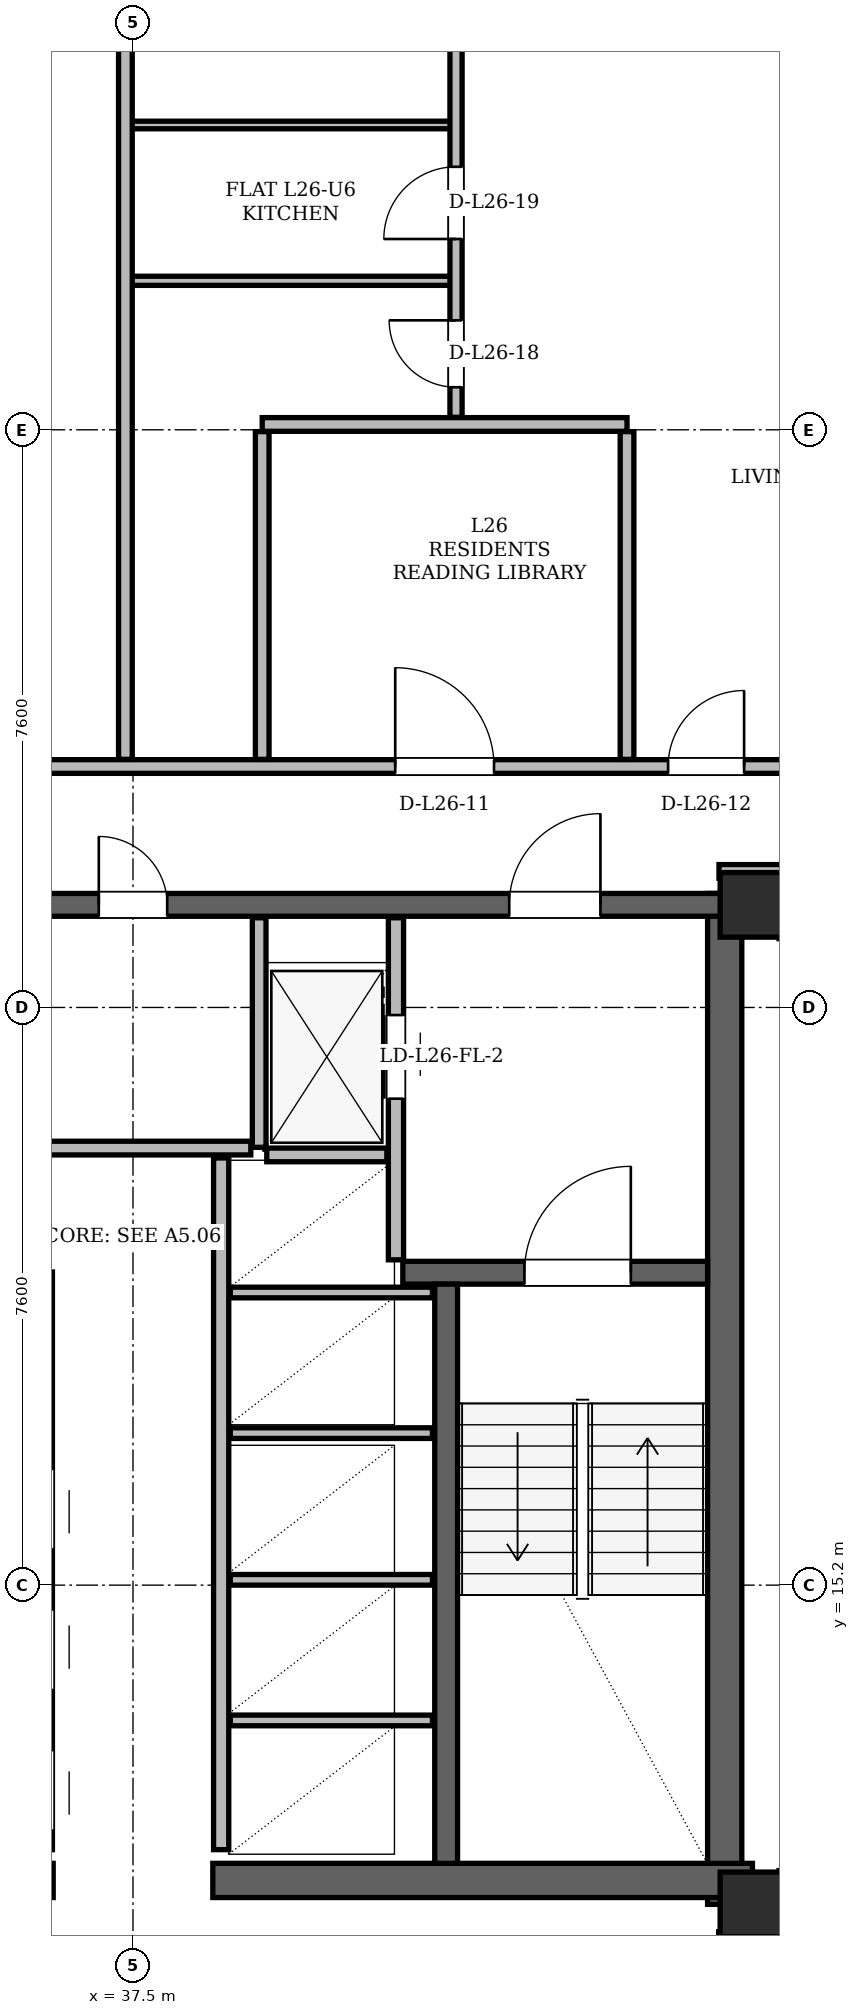
"""IFC4 building model, lengths in metres.
Left out: names, types, materials, properties, quantities, classifications, styles, units other than length and angle.
Written with IfcOpenShell. Run it as: python <this file> out.ifc"""

import sys

from ifc_helpers import new_model, si_unit, direction, frame, frame_2d, origin, origin_2d, place, context, subcontext, project, spatial, rectangle, hollow_rectangle, extrude, element, fill, save


model = new_model("IFC4")
c1 = context("Model", 3, precision=1e-05, world=origin(), true_north=direction((0.0, 1.0)))
c2 = subcontext(c1, "Body", "Model", "MODEL_VIEW")
j1 = project(units=[si_unit("LENGTHUNIT", "METRE"), si_unit("PLANEANGLEUNIT", "RADIAN")], contexts=[c1])
p1 = place(None, origin())
s1 = spatial("IfcSite", under=j1, at=p1, CompositionType="ELEMENT")
p2 = place(p1, origin())
s2 = spatial("IfcBuilding", under=s1, at=p2, CompositionType="ELEMENT")
p3 = place(p2, frame((0.0, 0.0, 100.5)))
s3 = spatial("IfcBuildingStorey", under=s2, at=p3, CompositionType="ELEMENT", Elevation=100.5)
for number, where, z_axis, x_axis in (
    (1, (45.65, 11.0, 0.0), (0.0, 0.0, 1.0), (1.0, 0.0, 0.0)),
    (2, (45.65, 24.15, 0.0), (0.0, 0.0, 1.0), (1.0, 0.0, 0.0)),
):
    element("IfcColumn", number, at=place(p3, frame(where, z_axis=z_axis, x_axis=x_axis)), inside=s3, PredefinedType="COLUMN", context=c2, shape_type="SweptSolid", body=[
        extrude(hollow_rectangle(XDim=0.85, YDim=0.85, WallThickness=0.07, at=origin_2d()), origin(), (0.0, 0.0, 1.0), 3.6),
    ])
p4 = place(p3, frame((45.285, 11.0, 0.0), z_axis=(0.0, 0.0, 1.0), x_axis=(0.0, 1.0, 0.0)))
e3 = element("IfcWall", 3, at=p4, inside=s3, PredefinedType="SHEAR", context=c2, shape_type="SweptSolid", body=[
    extrude(rectangle(XDim=13.3, YDim=0.45, at=frame_2d((6.65, 0.0))), origin(), (0.0, 0.0, 1.0), 3.36),
])
for number, where, z_axis, x_axis in (
    (4, (29.35, 11.315, 0.0), (0.0, 0.0, 1.0), (1.0, 0.0, 0.0)),
    (5, (38.55, 11.315, 0.0), (0.0, 0.0, 1.0), (1.0, 0.0, 0.0)),
):
    element("IfcWall", number, at=place(p3, frame(where, z_axis=z_axis, x_axis=x_axis)), inside=s3, PredefinedType="SHEAR", context=c2, shape_type="SweptSolid", body=[
        extrude(rectangle(XDim=7.1, YDim=0.45, at=frame_2d((3.55, 0.0))), origin(), (0.0, 0.0, 1.0), 3.36),
    ])
p5 = place(p3, frame((29.65, 24.15, 0.0), z_axis=(0.0, 0.0, 1.0), x_axis=(1.0, 0.0, 0.0)))
e6 = element("IfcWall", 6, at=p5, inside=s3, PredefinedType="SHEAR", context=c2, shape_type="SweptSolid", body=[
    extrude(rectangle(XDim=15.7, YDim=0.3, at=frame_2d((7.85, 0.0))), origin(), (0.0, 0.0, 1.0), 3.36),
])
p6 = place(p5, frame((1.7, 0.0, 0.0)))
e7 = element("IfcOpeningElement", 7, at=p6, cuts=e6, PredefinedType="OPENING", context=c2, shape_type="SweptSolid", body=[
    extrude(rectangle(XDim=1.2, YDim=2.2, at=frame_2d((0.6, 1.1))), frame((0.0, 0.15, 0.0), z_axis=(0.0, -1.0, 0.0), x_axis=(1.0, 0.0, 0.0)), (0.0, 0.0, 1.0), 0.3),
])
p7 = place(p5, frame((12.8, 0.0, 0.0)))
e8 = element("IfcOpeningElement", 8, at=p7, cuts=e6, PredefinedType="OPENING", context=c2, shape_type="SweptSolid", body=[
    extrude(rectangle(XDim=1.2, YDim=2.2, at=frame_2d((0.6, 1.1))), frame((0.0, 0.15, 0.0), z_axis=(0.0, -1.0, 0.0), x_axis=(1.0, 0.0, 0.0)), (0.0, 0.0, 1.0), 0.3),
])
p8 = place(p5, frame((7.4, 0.0, 0.0)))
e9 = element("IfcOpeningElement", 9, at=p8, cuts=e6, PredefinedType="OPENING", context=c2, shape_type="SweptSolid", body=[
    extrude(rectangle(XDim=0.9, YDim=2.05, at=frame_2d((0.45, 1.025))), frame((0.0, 0.15, 0.0), z_axis=(0.0, -1.0, 0.0), x_axis=(1.0, 0.0, 0.0)), (0.0, 0.0, 1.0), 0.3),
])
p9 = place(p3, frame((41.05, 19.31, 0.0), z_axis=(0.0, 0.0, 1.0), x_axis=(1.0, 0.0, 0.0)))
e10 = element("IfcWall", 10, at=p9, inside=s3, PredefinedType="SHEAR", context=c2, shape_type="SweptSolid", body=[
    extrude(rectangle(XDim=4.01, YDim=0.3, at=frame_2d((2.005, 0.0))), origin(), (0.0, 0.0, 1.0), 3.36),
])
p10 = place(p9, frame((1.6, 0.0, 0.0)))
e11 = element("IfcOpeningElement", 11, at=p10, cuts=e10, PredefinedType="OPENING", context=c2, shape_type="SweptSolid", body=[
    extrude(rectangle(XDim=1.4, YDim=2.2, at=frame_2d((0.7, 1.1))), frame((0.0, 0.15, 0.0), z_axis=(0.0, -1.0, 0.0), x_axis=(1.0, 0.0, 0.0)), (0.0, 0.0, 1.0), 0.3),
])
p11 = place(p3, frame((41.62, 11.54, 0.0), z_axis=(0.0, 0.0, 1.0), x_axis=(0.0, 1.0, 0.0)))
e12 = element("IfcWall", 12, at=p11, inside=s3, PredefinedType="SHEAR", context=c2, shape_type="SweptSolid", body=[
    extrude(rectangle(XDim=7.62, YDim=0.3, at=frame_2d((3.81, 0.0))), origin(), (0.0, 0.0, 1.0), 3.36),
])
p12 = place(p3, frame((60.69, 13.561, 0.0), z_axis=(0.0, 0.0, 1.0), x_axis=(-0.500002056916, 0.86602421622, 0.0)))
e13 = element("IfcWall", 13, at=p12, inside=s3, PredefinedType="SOLIDWALL", context=c2, shape_type="SweptSolid", body=[
    extrude(rectangle(XDim=34.516, YDim=0.34, at=frame_2d((17.258, 0.0))), origin(), (0.0, 0.0, 1.0), 2.578),
])
p13 = place(p12, frame((8.034, 0.0, 0.0)))
e14 = element("IfcOpeningElement", 14, at=p13, cuts=e13, PredefinedType="OPENING", context=c2, shape_type="SweptSolid", body=[
    extrude(rectangle(XDim=1.5, YDim=2.2, at=frame_2d((0.75, 1.1))), frame((0.0, 0.17, 0.0), z_axis=(0.0, -1.0, 0.0), x_axis=(1.0, 0.0, 0.0)), (0.0, 0.0, 1.0), 0.34),
])
p14 = place(p12, frame((26.647, 0.0, 0.0)))
e15 = element("IfcOpeningElement", 15, at=p14, cuts=e13, PredefinedType="OPENING", context=c2, shape_type="SweptSolid", body=[
    extrude(rectangle(XDim=1.5, YDim=2.2, at=frame_2d((0.75, 1.1))), frame((0.0, 0.17, 0.0), z_axis=(0.0, -1.0, 0.0), x_axis=(1.0, 0.0, 0.0)), (0.0, 0.0, 1.0), 0.34),
])
p15 = place(p12, frame((1.477, 0.0, 0.85)))
e16 = element("IfcOpeningElement", 16, at=p15, cuts=e13, PredefinedType="OPENING", context=c2, shape_type="SweptSolid", body=[
    extrude(rectangle(XDim=2.5, YDim=1.618, at=frame_2d((1.25, 0.809))), frame((0.0, 0.17, 0.0), z_axis=(0.0, -1.0, 0.0), x_axis=(1.0, 0.0, 0.0)), (0.0, 0.0, 1.0), 0.34),
])
p16 = place(p12, frame((16.107, 0.0, 0.85)))
e17 = element("IfcOpeningElement", 17, at=p16, cuts=e13, PredefinedType="OPENING", context=c2, shape_type="SweptSolid", body=[
    extrude(rectangle(XDim=1.4, YDim=1.6, at=frame_2d((0.7, 0.8))), frame((0.0, 0.17, 0.0), z_axis=(0.0, -1.0, 0.0), x_axis=(1.0, 0.0, 0.0)), (0.0, 0.0, 1.0), 0.34),
])
p17 = place(p12, frame((30.693, 0.0, 0.85)))
e18 = element("IfcOpeningElement", 18, at=p17, cuts=e13, PredefinedType="OPENING", context=c2, shape_type="SweptSolid", body=[
    extrude(rectangle(XDim=2.5, YDim=1.618, at=frame_2d((1.25, 0.809))), frame((0.0, 0.17, 0.0), z_axis=(0.0, -1.0, 0.0), x_axis=(1.0, 0.0, 0.0)), (0.0, 0.0, 1.0), 0.34),
])
p18 = place(p3, frame((40.96, 19.48, 0.0), z_axis=(0.0, 0.0, 1.0), x_axis=(0.0, 1.0, 0.0)))
e19 = element("IfcWall", 19, at=p18, inside=s3, PredefinedType="PARTITIONING", context=c2, shape_type="SweptSolid", body=[
    extrude(rectangle(XDim=4.5, YDim=0.2, at=frame_2d((2.25, 0.0))), origin(), (0.0, 0.0, 1.0), 2.4),
])
p19 = place(p18, frame((2.12, 0.0, 0.0)))
e20 = element("IfcOpeningElement", 20, at=p19, cuts=e19, PredefinedType="OPENING", context=c2, shape_type="SweptSolid", body=[
    extrude(rectangle(XDim=1.1, YDim=2.2, at=frame_2d((0.55, 1.1))), frame((0.0, 0.1, 0.0), z_axis=(0.0, -1.0, 0.0), x_axis=(1.0, 0.0, 0.0)), (0.0, 0.0, 1.0), 0.2),
])
p20 = place(p3, frame((39.16, 20.96, 0.0), z_axis=(0.0, 0.0, 1.0), x_axis=(0.0, 1.0, 0.0)))
e21 = element("IfcWall", 21, at=p20, inside=s3, PredefinedType="PARTITIONING", context=c2, shape_type="SweptSolid", body=[
    extrude(rectangle(XDim=3.02, YDim=0.18, at=frame_2d((1.51, 0.0))), origin(), (0.0, 0.0, 1.0), 2.4),
])
p21 = place(p3, frame((39.26, 20.86, 0.0), z_axis=(0.0, 0.0, 1.0), x_axis=(1.0, 0.0, 0.0)))
e22 = element("IfcWall", 22, at=p21, inside=s3, PredefinedType="PARTITIONING", context=c2, shape_type="SweptSolid", body=[
    extrude(rectangle(XDim=1.58, YDim=0.18, at=frame_2d((0.79, 0.0))), origin(), (0.0, 0.0, 1.0), 3.36),
])
p22 = place(p3, frame((36.34, 11.72, 0.0), z_axis=(0.0, 0.0, 1.0), x_axis=(0.0, 1.0, 0.0)))
e23 = element("IfcWall", 23, at=p22, inside=s3, PredefinedType="PARTITIONING", context=c2, shape_type="SweptSolid", body=[
    extrude(rectangle(XDim=7.6, YDim=0.2, at=frame_2d((3.8, 0.0))), origin(), (0.0, 0.0, 1.0), 3.36),
])
p23 = place(p22, frame((0.255, 0.0, 0.0)))
e24 = element("IfcOpeningElement", 24, at=p23, cuts=e23, PredefinedType="OPENING", context=c2, shape_type="SweptSolid", body=[
    extrude(rectangle(XDim=1.05, YDim=2.15, at=frame_2d((0.525, 1.075))), frame((0.0, 0.1, 0.0), z_axis=(0.0, -1.0, 0.0), x_axis=(1.0, 0.0, 0.0)), (0.0, 0.0, 1.0), 0.2),
])
p24 = place(p22, frame((2.105, 0.0, 0.0)))
e25 = element("IfcOpeningElement", 25, at=p24, cuts=e23, PredefinedType="OPENING", context=c2, shape_type="SweptSolid", body=[
    extrude(rectangle(XDim=1.05, YDim=2.15, at=frame_2d((0.525, 1.075))), frame((0.0, 0.1, 0.0), z_axis=(0.0, -1.0, 0.0), x_axis=(1.0, 0.0, 0.0)), (0.0, 0.0, 1.0), 0.2),
])
p25 = place(p22, frame((3.955, 0.0, 0.0)))
e26 = element("IfcOpeningElement", 26, at=p25, cuts=e23, PredefinedType="OPENING", context=c2, shape_type="SweptSolid", body=[
    extrude(rectangle(XDim=1.05, YDim=2.15, at=frame_2d((0.525, 1.075))), frame((0.0, 0.1, 0.0), z_axis=(0.0, -1.0, 0.0), x_axis=(1.0, 0.0, 0.0)), (0.0, 0.0, 1.0), 0.2),
])
p26 = place(p3, frame((38.66, 11.72, 0.0), z_axis=(0.0, 0.0, 1.0), x_axis=(0.0, 1.0, 0.0)))
e27 = element("IfcWall", 27, at=p26, inside=s3, PredefinedType="PARTITIONING", context=c2, shape_type="SweptSolid", body=[
    extrude(rectangle(XDim=9.1, YDim=0.2, at=frame_2d((4.55, 0.0))), origin(), (0.0, 0.0, 1.0), 3.36),
])
for number, where, z_axis, x_axis in (
    (28, (38.78, 13.42, 0.0), (0.0, 0.0, 1.0), (1.0, 0.0, 0.0)),
    (29, (38.78, 15.27, 0.0), (0.0, 0.0, 1.0), (1.0, 0.0, 0.0)),
    (30, (38.78, 17.2, 0.0), (0.0, 0.0, 1.0), (1.0, 0.0, 0.0)),
    (31, (38.78, 19.05, 0.0), (0.0, 0.0, 1.0), (1.0, 0.0, 0.0)),
):
    element("IfcWall", number, at=place(p3, frame(where, z_axis=z_axis, x_axis=x_axis)), inside=s3, PredefinedType="PARTITIONING", context=c2, shape_type="SweptSolid", body=[
        extrude(rectangle(XDim=2.66, YDim=0.14, at=frame_2d((1.33, 0.0))), origin(), (0.0, 0.0, 1.0), 3.36),
    ])
p27 = place(p3, frame((35.95, 20.95, 0.0), z_axis=(0.0, 0.0, 1.0), x_axis=(1.0, 0.0, 0.0)))
e32 = element("IfcWall", 32, at=p27, inside=s3, PredefinedType="PARTITIONING", context=c2, shape_type="SweptSolid", body=[
    extrude(rectangle(XDim=3.1, YDim=0.18, at=frame_2d((1.55, 0.0))), origin(), (0.0, 0.0, 1.0), 3.36),
])
p28 = place(p3, frame((45.205, 10.55, 0.0), z_axis=(0.0, 0.0, 1.0), x_axis=(1.0, 0.0, 0.0)))
e33 = element("IfcWall", 33, at=p28, inside=s3, PredefinedType="PARTITIONING", context=c2, shape_type="SweptSolid", body=[
    extrude(rectangle(XDim=0.89, YDim=0.18, at=frame_2d((0.445, 0.0))), origin(), (0.0, 0.0, 1.0), 3.36),
])
p29 = place(p3, frame((45.21, 24.59, 0.0), z_axis=(0.0, 0.0, 1.0), x_axis=(1.0, 0.0, 0.0)))
e34 = element("IfcWall", 34, at=p29, inside=s3, PredefinedType="PARTITIONING", context=c2, shape_type="SweptSolid", body=[
    extrude(rectangle(XDim=0.88, YDim=0.18, at=frame_2d((0.44, 0.0))), origin(), (0.0, 0.0, 1.0), 2.814),
])
p30 = place(p3, frame((27.55, 25.97, 0.0), z_axis=(0.0, 0.0, 1.0), x_axis=(1.0, 0.0, 0.0)))
e35 = element("IfcWall", 35, at=p30, inside=s3, PredefinedType="PARTITIONING", context=c2, shape_type="SweptSolid", body=[
    extrude(rectangle(XDim=19.9, YDim=0.18, at=frame_2d((9.95, 0.0))), origin(), (0.0, 0.0, 1.0), 2.814),
])
p31 = place(p30, frame((4.446, 0.0, 0.0)))
e36 = element("IfcOpeningElement", 36, at=p31, cuts=e35, PredefinedType="OPENING", context=c2, shape_type="SweptSolid", body=[
    extrude(rectangle(XDim=1.0, YDim=2.18, at=frame_2d((0.5, 1.09))), frame((0.0, 0.09, 0.0), z_axis=(0.0, -1.0, 0.0), x_axis=(1.0, 0.0, 0.0)), (0.0, 0.0, 1.0), 0.18),
])
p32 = place(p30, frame((13.4, 0.0, 0.0)))
e37 = element("IfcOpeningElement", 37, at=p32, cuts=e35, PredefinedType="OPENING", context=c2, shape_type="SweptSolid", body=[
    extrude(rectangle(XDim=1.3, YDim=2.2, at=frame_2d((0.65, 1.1))), frame((0.0, 0.09, 0.0), z_axis=(0.0, -1.0, 0.0), x_axis=(1.0, 0.0, 0.0)), (0.0, 0.0, 1.0), 0.18),
])
p33 = place(p30, frame((16.99, 0.0, 0.0)))
e38 = element("IfcOpeningElement", 38, at=p33, cuts=e35, PredefinedType="OPENING", context=c2, shape_type="SweptSolid", body=[
    extrude(rectangle(XDim=1.0, YDim=2.18, at=frame_2d((0.5, 1.09))), frame((0.0, 0.09, 0.0), z_axis=(0.0, -1.0, 0.0), x_axis=(1.0, 0.0, 0.0)), (0.0, 0.0, 1.0), 0.18),
])
p34 = place(p3, frame((39.2, 30.47, 0.0), z_axis=(0.0, 0.0, 1.0), x_axis=(1.0, 0.0, 0.0)))
e39 = element("IfcWall", 39, at=p34, inside=s3, PredefinedType="PARTITIONING", context=c2, shape_type="SweptSolid", body=[
    extrude(rectangle(XDim=4.8, YDim=0.18, at=frame_2d((2.4, 0.0))), origin(), (0.0, 0.0, 1.0), 3.36),
])
p35 = place(p3, frame((37.35, 32.36, 0.0), z_axis=(0.0, 0.0, 1.0), x_axis=(1.0, 0.0, 0.0)))
e40 = element("IfcWall", 40, at=p35, inside=s3, PredefinedType="PARTITIONING", context=c2, shape_type="SweptSolid", body=[
    extrude(rectangle(XDim=4.4, YDim=0.12, at=frame_2d((2.2, 0.0))), origin(), (0.0, 0.0, 1.0), 3.36),
])
p36 = place(p3, frame((37.35, 34.41, 0.0), z_axis=(0.0, 0.0, 1.0), x_axis=(1.0, 0.0, 0.0)))
e41 = element("IfcWall", 41, at=p36, inside=s3, PredefinedType="PARTITIONING", context=c2, shape_type="SweptSolid", body=[
    extrude(rectangle(XDim=4.4, YDim=0.1, at=frame_2d((2.2, 0.0))), origin(), (0.0, 0.0, 1.0), 3.36),
])
p37 = place(p3, frame((37.4, 26.064, 0.0), z_axis=(0.0, 0.0, 1.0), x_axis=(0.0, 1.0, 0.0)))
e42 = element("IfcWall", 42, at=p37, inside=s3, PredefinedType="PARTITIONING", context=c2, shape_type="SweptSolid", body=[
    extrude(rectangle(XDim=17.215, YDim=0.18, at=frame_2d((8.607, 0.0))), origin(), (0.0, 0.0, 1.0), 3.36),
])
p38 = place(p3, frame((39.2, 26.064, 0.0), z_axis=(0.0, 0.0, 1.0), x_axis=(0.0, 1.0, 0.0)))
e43 = element("IfcWall", 43, at=p38, inside=s3, PredefinedType="PARTITIONING", context=c2, shape_type="SweptSolid", body=[
    extrude(rectangle(XDim=4.312, YDim=0.18, at=frame_2d((2.156, 0.0))), origin(), (0.0, 0.0, 1.0), 3.36),
])
p39 = place(p3, frame((41.75, 30.564, 0.0), z_axis=(0.0, 0.0, 1.0), x_axis=(0.0, 1.0, 0.0)))
e44 = element("IfcWall", 44, at=p39, inside=s3, PredefinedType="PARTITIONING", context=c2, shape_type="SweptSolid", body=[
    extrude(rectangle(XDim=12.715, YDim=0.16, at=frame_2d((6.357, 0.0))), origin(), (0.0, 0.0, 1.0), 3.36),
])
p40 = place(p39, frame((0.396, 0.0, 0.0)))
e45 = element("IfcOpeningElement", 45, at=p40, cuts=e44, PredefinedType="OPENING", context=c2, shape_type="SweptSolid", body=[
    extrude(rectangle(XDim=0.88, YDim=2.08, at=frame_2d((0.44, 1.04))), frame((0.0, 0.08, 0.0), z_axis=(0.0, -1.0, 0.0), x_axis=(1.0, 0.0, 0.0)), (0.0, 0.0, 1.0), 0.16),
])
p41 = place(p39, frame((2.346, 0.0, 0.0)))
e46 = element("IfcOpeningElement", 46, at=p41, cuts=e44, PredefinedType="OPENING", context=c2, shape_type="SweptSolid", body=[
    extrude(rectangle(XDim=0.95, YDim=2.1, at=frame_2d((0.475, 1.05))), frame((0.0, 0.08, 0.0), z_axis=(0.0, -1.0, 0.0), x_axis=(1.0, 0.0, 0.0)), (0.0, 0.0, 1.0), 0.16),
])
p42 = place(p39, frame((7.847, 0.0, 0.0)))
e47 = element("IfcOpeningElement", 47, at=p42, cuts=e44, PredefinedType="OPENING", context=c2, shape_type="SweptSolid", body=[
    extrude(rectangle(XDim=0.92, YDim=2.12, at=frame_2d((0.46, 1.06))), frame((0.0, 0.08, 0.0), z_axis=(0.0, -1.0, 0.0), x_axis=(1.0, 0.0, 0.0)), (0.0, 0.0, 1.0), 0.16),
])
p43 = place(p3, frame((44.0, 26.064, 0.0), z_axis=(0.0, 0.0, 1.0), x_axis=(0.0, 1.0, 0.0)))
e48 = element("IfcWall", 48, at=p43, inside=s3, PredefinedType="PARTITIONING", context=c2, shape_type="SweptSolid", body=[
    extrude(rectangle(XDim=4.312, YDim=0.18, at=frame_2d((2.156, 0.0))), origin(), (0.0, 0.0, 1.0), 2.946),
])
p44 = place(p19, origin())
e49 = element("IfcDoor", 49, at=p44, inside=s3, OperationType="SLIDING_TO_RIGHT", PredefinedType="DOOR", context=c2, shape_type="SweptSolid", body=[
    extrude(rectangle(XDim=1.1, YDim=2.2, at=frame_2d((0.55, 1.1))), frame((0.0, 0.025, 0.0), z_axis=(0.0, -1.0, 0.0), x_axis=(1.0, 0.0, 0.0)), (0.0, 0.0, 1.0), 0.05),
])
fill(e20, e49)
p45 = place(p10, origin())
e50 = element("IfcDoor", 50, at=p45, inside=s3, OperationType="SINGLE_SWING_RIGHT", PredefinedType="DOOR", context=c2, shape_type="SweptSolid", body=[
    extrude(rectangle(XDim=1.4, YDim=2.2, at=frame_2d((0.7, 1.1))), frame((0.0, 0.025, 0.0), z_axis=(0.0, -1.0, 0.0), x_axis=(1.0, 0.0, 0.0)), (0.0, 0.0, 1.0), 0.05),
])
fill(e11, e50)
p46 = place(p7, origin())
e51 = element("IfcDoor", 51, at=p46, inside=s3, OperationType="SINGLE_SWING_RIGHT", PredefinedType="DOOR", context=c2, shape_type="SweptSolid", body=[
    extrude(rectangle(XDim=1.2, YDim=2.2, at=frame_2d((0.6, 1.1))), frame((0.0, 0.025, 0.0), z_axis=(0.0, -1.0, 0.0), x_axis=(1.0, 0.0, 0.0)), (0.0, 0.0, 1.0), 0.05),
])
fill(e8, e51)
p47 = place(p8, origin())
e52 = element("IfcDoor", 52, at=p47, inside=s3, OperationType="SINGLE_SWING_LEFT", PredefinedType="DOOR", context=c2, shape_type="SweptSolid", body=[
    extrude(rectangle(XDim=0.9, YDim=2.05, at=frame_2d((0.45, 1.025))), frame((0.0, 0.025, 0.0), z_axis=(0.0, -1.0, 0.0), x_axis=(1.0, 0.0, 0.0)), (0.0, 0.0, 1.0), 0.05),
])
fill(e9, e52)
p48 = place(p32, origin())
e53 = element("IfcDoor", 53, at=p48, inside=s3, OperationType="SINGLE_SWING_LEFT", PredefinedType="DOOR", context=c2, shape_type="SweptSolid", body=[
    extrude(rectangle(XDim=1.3, YDim=2.2, at=frame_2d((0.65, 1.1))), frame((0.0, 0.025, 0.0), z_axis=(0.0, -1.0, 0.0), x_axis=(1.0, 0.0, 0.0)), (0.0, 0.0, 1.0), 0.05),
])
fill(e37, e53)
p49 = place(p33, origin())
e54 = element("IfcDoor", 54, at=p49, inside=s3, OperationType="SINGLE_SWING_RIGHT", PredefinedType="DOOR", context=c2, shape_type="SweptSolid", body=[
    extrude(rectangle(XDim=1.0, YDim=2.18, at=frame_2d((0.5, 1.09))), frame((0.0, 0.025, 0.0), z_axis=(0.0, -1.0, 0.0), x_axis=(1.0, 0.0, 0.0)), (0.0, 0.0, 1.0), 0.05),
])
fill(e38, e54)
p50 = place(p40, origin())
e55 = element("IfcDoor", 55, at=p50, inside=s3, OperationType="SINGLE_SWING_RIGHT", PredefinedType="DOOR", context=c2, shape_type="SweptSolid", body=[
    extrude(rectangle(XDim=0.88, YDim=2.08, at=frame_2d((0.44, 1.04))), frame((0.0, 0.025, 0.0), z_axis=(0.0, -1.0, 0.0), x_axis=(1.0, 0.0, 0.0)), (0.0, 0.0, 1.0), 0.05),
])
fill(e45, e55)
p51 = place(p41, origin())
e56 = element("IfcDoor", 56, at=p51, inside=s3, OperationType="SINGLE_SWING_LEFT", PredefinedType="DOOR", context=c2, shape_type="SweptSolid", body=[
    extrude(rectangle(XDim=0.95, YDim=2.1, at=frame_2d((0.475, 1.05))), frame((0.0, 0.025, 0.0), z_axis=(0.0, -1.0, 0.0), x_axis=(1.0, 0.0, 0.0)), (0.0, 0.0, 1.0), 0.05),
])
fill(e46, e56)
save(model, sys.argv[1])
